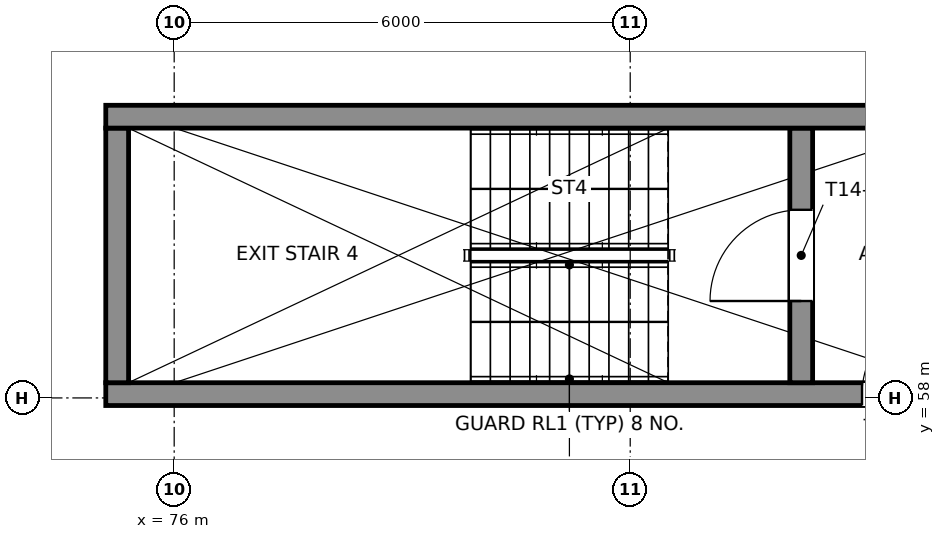
"""IFC4 building model, lengths in metres.
Left out: names, types, materials, properties, quantities, classifications, styles, units other than length and angle.
Written with IfcOpenShell. Run it as: python <this file> out.ifc"""

import sys

from ifc_helpers import new_model, si_unit, direction, frame, frame_2d, origin, place, context, subcontext, project, spatial, rectangle, extrude, element, fill, save


model = new_model("IFC4")
c1 = context("Model", 3, precision=1e-05, world=origin(), true_north=direction((0.0, 1.0)))
c2 = subcontext(c1, "Body", "Model", "MODEL_VIEW")
j1 = project(units=[si_unit("LENGTHUNIT", "METRE"), si_unit("PLANEANGLEUNIT", "RADIAN")], contexts=[c1])
p1 = place(None, origin())
s1 = spatial("IfcSite", under=j1, at=p1, CompositionType="ELEMENT")
p2 = place(p1, origin())
s2 = spatial("IfcBuilding", under=s1, at=p2, CompositionType="ELEMENT")
p3 = place(p2, frame((0.0, 0.0, 204.3)))
s3 = spatial("IfcBuildingStorey", under=s2, at=p3, CompositionType="ELEMENT", Elevation=204.3)
p4 = place(p3, frame((75.1, 58.05, 0.0), z_axis=(0.0, 0.0, 1.0), x_axis=(1.0, 0.0, 0.0)))
e1 = element("IfcWall", 1, at=p4, inside=s3, PredefinedType="SHEAR", context=c2, shape_type="SweptSolid", body=[
    extrude(rectangle(XDim=11.9, YDim=0.3, at=frame_2d((5.95, 0.0))), origin(), (0.0, 0.0, 1.0), 3.9),
])
p5 = place(p4, frame((9.95, 0.0, 0.0)))
e2 = element("IfcOpeningElement", 2, at=p5, cuts=e1, PredefinedType="OPENING", context=c2, shape_type="SweptSolid", body=[
    extrude(rectangle(XDim=1.1, YDim=2.1, at=frame_2d((0.55, 1.05))), frame((0.0, 0.16, 0.0), z_axis=(0.0, -1.0, 0.0), x_axis=(1.0, 0.0, 0.0)), (0.0, 0.0, 1.0), 0.32),
])
p6 = place(p3, frame((75.25, 58.2, 0.0), z_axis=(0.0, 0.0, 1.0), x_axis=(0.0, 1.0, 0.0)))
e3 = element("IfcWall", 3, at=p6, inside=s3, PredefinedType="SHEAR", context=c2, shape_type="SweptSolid", body=[
    extrude(rectangle(XDim=3.35, YDim=0.3, at=frame_2d((1.675, 0.0))), origin(), (0.0, 0.0, 1.0), 3.9),
])
p7 = place(p3, frame((84.25, 58.2, 0.0), z_axis=(0.0, 0.0, 1.0), x_axis=(0.0, 1.0, 0.0)))
e4 = element("IfcWall", 4, at=p7, inside=s3, PredefinedType="SHEAR", context=c2, shape_type="SweptSolid", body=[
    extrude(rectangle(XDim=3.35, YDim=0.3, at=frame_2d((1.675, 0.0))), origin(), (0.0, 0.0, 1.0), 3.9),
])
p8 = place(p7, frame((1.075, 0.0, 0.0)))
e5 = element("IfcOpeningElement", 5, at=p8, cuts=e4, PredefinedType="OPENING", context=c2, shape_type="SweptSolid", body=[
    extrude(rectangle(XDim=1.2, YDim=2.1, at=frame_2d((0.6, 1.05))), frame((0.0, 0.16, 0.0), z_axis=(0.0, -1.0, 0.0), x_axis=(1.0, 0.0, 0.0)), (0.0, 0.0, 1.0), 0.32),
])
p9 = place(p3, frame((75.1, 61.7, 0.0), z_axis=(0.0, 0.0, 1.0), x_axis=(1.0, 0.0, 0.0)))
e6 = element("IfcWall", 6, at=p9, inside=s3, PredefinedType="SHEAR", context=c2, shape_type="SweptSolid", body=[
    extrude(rectangle(XDim=11.9, YDim=0.3, at=frame_2d((5.95, 0.0))), origin(), (0.0, 0.0, 1.0), 3.9),
])
p10 = place(p5, origin())
e7 = element("IfcDoor", 7, at=p10, inside=s3, OperationType="SINGLE_SWING_RIGHT", PredefinedType="DOOR", context=c2, shape_type="SweptSolid", body=[
    extrude(rectangle(XDim=1.1, YDim=2.1, at=frame_2d((0.55, 1.05))), frame((0.0, 0.025, 0.0), z_axis=(0.0, -1.0, 0.0), x_axis=(1.0, 0.0, 0.0)), (0.0, 0.0, 1.0), 0.05),
])
fill(e2, e7)
p11 = place(p8, origin())
e8 = element("IfcDoor", 8, at=p11, inside=s3, OperationType="SINGLE_SWING_LEFT", PredefinedType="DOOR", context=c2, shape_type="SweptSolid", body=[
    extrude(rectangle(XDim=1.2, YDim=2.1, at=frame_2d((0.6, 1.05))), frame((0.0, 0.025, 0.0), z_axis=(0.0, -1.0, 0.0), x_axis=(1.0, 0.0, 0.0)), (0.0, 0.0, 1.0), 0.05),
])
fill(e5, e8)
save(model, sys.argv[1])
